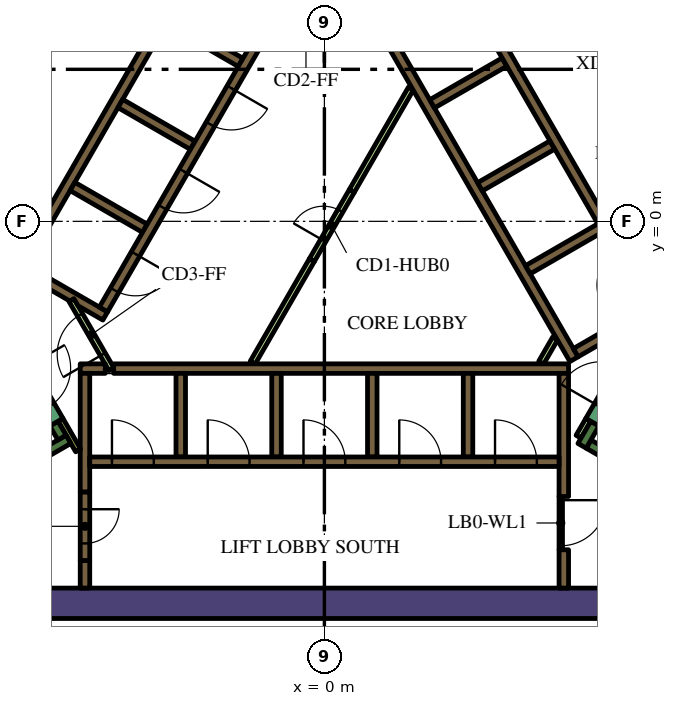
"""IFC4 building model, lengths in metres.
Left out: names, types, materials, properties, quantities, classifications, styles, units other than length and angle.
Written with IfcOpenShell. Run it as: python <this file> out.ifc"""

import sys

from ifc_helpers import new_model, si_unit, direction, frame, frame_2d, origin, place, context, subcontext, project, spatial, polyline, rectangle, outline, extrude, element, fill, save


model = new_model("IFC4")
c1 = context("Model", 3, precision=1e-05, world=origin(), true_north=direction((0.0, 1.0)))
c2 = subcontext(c1, "Body", "Model", "MODEL_VIEW")
j1 = project(units=[si_unit("LENGTHUNIT", "METRE"), si_unit("PLANEANGLEUNIT", "RADIAN")], contexts=[c1])
p1 = place(None, origin())
s1 = spatial("IfcSite", under=j1, at=p1, CompositionType="ELEMENT")
p2 = place(p1, origin())
s2 = spatial("IfcBuilding", under=s1, at=p2, CompositionType="ELEMENT")
p3 = place(p2, frame((0.0, 0.0, 158.4)))
s3 = spatial("IfcBuildingStorey", under=s2, at=p3, CompositionType="ELEMENT", Elevation=158.4)
p4 = place(p3, frame((-13.378, -10.05, 0.0), z_axis=(0.0, 0.0, 1.0), x_axis=(1.0, 0.0, 0.0)))
e1 = element("IfcWall", 1, at=p4, inside=s3, PredefinedType="SOLIDWALL", context=c2, shape_type="SweptSolid", body=[
    extrude(rectangle(XDim=22.282, YDim=0.8, at=frame_2d((11.141, 0.0))), origin(), (0.0, 0.0, 1.0), 4.2),
])
p5 = place(p3, frame((-12.668, -1.842, 0.0), z_axis=(0.0, 0.0, 1.0), x_axis=(0.500003640647, 0.866023301845, 0.0)))
e2 = element("IfcWall", 2, at=p5, inside=s3, PredefinedType="SOLIDWALL", context=c2, shape_type="SweptSolid", body=[
    extrude(rectangle(XDim=15.858, YDim=0.8, at=frame_2d((7.929, 0.0))), origin(), (0.0, 0.0, 1.0), 4.2),
])
p6 = place(p3, frame((12.84, -9.261, 0.0), z_axis=(0.0, 0.0, 1.0), x_axis=(-0.866013990052, 0.500019768644, 0.0)))
e3 = element("IfcWall", 3, at=p6, inside=s3, PredefinedType="SOLIDWALL", context=c2, shape_type="SweptSolid", body=[
    extrude(rectangle(XDim=6.8, YDim=0.25, at=frame_2d((3.4, 0.0))), origin(), (0.0, 0.0, 1.0), 4.2),
])
p7 = place(p3, frame((6.78, -5.906, 0.0), z_axis=(0.0, 0.0, 1.0), x_axis=(0.500223362819, 0.865896406789, 0.0)))
e4 = element("IfcWall", 4, at=p7, inside=s3, PredefinedType="SOLIDWALL", context=c2, shape_type="SweptSolid", body=[
    extrude(rectangle(XDim=0.675, YDim=0.25, at=frame_2d((0.337, 0.0))), origin(), (0.0, 0.0, 1.0), 4.2),
])
p8 = place(p3, frame((-12.84, -9.261, 0.0), z_axis=(0.0, 0.0, 1.0), x_axis=(0.866016039709, 0.500016218704, 0.0)))
e5 = element("IfcWall", 5, at=p8, inside=s3, PredefinedType="SOLIDWALL", context=c2, shape_type="SweptSolid", body=[
    extrude(rectangle(XDim=7.05, YDim=0.25, at=frame_2d((3.525, 0.0))), origin(), (0.0, 0.0, 1.0), 4.2),
])
p9 = place(p3, frame((-6.905, -5.69, 0.0), z_axis=(0.0, 0.0, 1.0), x_axis=(-0.500402024738, 0.865793170242, 0.0)))
e6 = element("IfcWall", 6, at=p9, inside=s3, PredefinedType="SOLIDWALL", context=c2, shape_type="SweptSolid", body=[
    extrude(rectangle(XDim=0.425, YDim=0.25, at=frame_2d((0.212, 0.0))), origin(), (0.0, 0.0, 1.0), 4.2),
])
p10 = place(p3, frame((-6.3, -8.925, 0.0), z_axis=(0.0, 0.0, 1.0), x_axis=(0.0, -1.0, 0.0)))
e7 = element("IfcWall", 7, at=p10, inside=s3, PredefinedType="SOLIDWALL", context=c2, shape_type="SweptSolid", body=[
    extrude(rectangle(XDim=0.725, YDim=0.25, at=frame_2d((0.363, 0.0))), origin(), (0.0, 0.0, 1.0), 4.2),
])
p11 = place(p3, frame((-5.545, -3.875, 0.0), z_axis=(0.0, 0.0, 1.0), x_axis=(1.0, 0.0, 0.0)))
e8 = element("IfcWall", 8, at=p11, inside=s3, PredefinedType="SOLIDWALL", context=c2, shape_type="SweptSolid", body=[
    extrude(rectangle(XDim=11.97, YDim=0.25, at=frame_2d((5.985, 0.0))), origin(), (0.0, 0.0, 1.0), 4.2),
])
p12 = place(p3, frame((-6.425, -3.875, 0.0), z_axis=(0.0, 0.0, 1.0), x_axis=(1.0, 0.0, 0.0)))
e9 = element("IfcWall", 9, at=p12, inside=s3, PredefinedType="SOLIDWALL", context=c2, shape_type="SweptSolid", body=[
    extrude(rectangle(XDim=0.658, YDim=0.25, at=frame_2d((0.329, 0.0))), origin(), (0.0, 0.0, 1.0), 4.2),
])
p13 = place(p3, frame((6.3, -7.24, 0.0), z_axis=(0.0, 0.0, 1.0), x_axis=(0.0, 1.0, 0.0)))
e10 = element("IfcWall", 10, at=p13, inside=s3, PredefinedType="SOLIDWALL", context=c2, shape_type="SweptSolid", body=[
    extrude(rectangle(XDim=3.24, YDim=0.25, at=frame_2d((1.62, 0.0))), origin(), (0.0, 0.0, 1.0), 4.2),
])
p14 = place(p3, frame((6.3, -9.65, 0.0), z_axis=(0.0, 0.0, 1.0), x_axis=(0.0, 1.0, 0.0)))
e11 = element("IfcWall", 11, at=p14, inside=s3, PredefinedType="SOLIDWALL", context=c2, shape_type="SweptSolid", body=[
    extrude(rectangle(XDim=1.008, YDim=0.25, at=frame_2d((0.504, 0.0))), origin(), (0.0, 0.0, 1.0), 4.2),
])
for number, where, z_axis, x_axis in (
    (12, (3.78, -4.0, 0.0), (0.0, 0.0, 1.0), (0.0, -1.0, 0.0)),
    (13, (1.26, -4.0, 0.0), (0.0, 0.0, 1.0), (0.0, -1.0, 0.0)),
    (14, (-1.26, -4.0, 0.0), (0.0, 0.0, 1.0), (0.0, -1.0, 0.0)),
    (15, (-3.78, -4.0, 0.0), (0.0, 0.0, 1.0), (0.0, -1.0, 0.0)),
):
    element("IfcWall", number, at=place(p3, frame(where, z_axis=z_axis, x_axis=x_axis)), inside=s3, PredefinedType="SOLIDWALL", context=c2, shape_type="SweptSolid", body=[
        extrude(rectangle(XDim=2.2, YDim=0.25, at=frame_2d((1.1, 0.0))), origin(), (0.0, 0.0, 1.0), 4.2),
    ])
p15 = place(p3, frame((-6.3, -7.125, 0.0), z_axis=(0.0, 0.0, 1.0), x_axis=(0.0, 1.0, 0.0)))
e16 = element("IfcWall", 16, at=p15, inside=s3, PredefinedType="SOLIDWALL", context=c2, shape_type="SweptSolid", body=[
    extrude(rectangle(XDim=3.125, YDim=0.25, at=frame_2d((1.562, 0.0))), origin(), (0.0, 0.0, 1.0), 4.2),
])
p16 = place(p3, frame((6.568, -3.627, 0.0), z_axis=(0.0, 0.0, 1.0), x_axis=(-0.499999455981, 0.866025717874, 0.0)))
e17 = element("IfcWall", 17, at=p16, inside=s3, PredefinedType="SOLIDWALL", context=c2, shape_type="SweptSolid", body=[
    extrude(rectangle(XDim=11.978, YDim=0.25, at=frame_2d((5.989, 0.0))), origin(), (0.0, 0.0, 1.0), 4.2),
])
for number, where, z_axis, x_axis in (
    (18, (2.834, 3.091, 0.0), (0.0, 0.0, 1.0), (0.866, 0.5, 0.0)),
    (19, (4.094, 0.909, 0.0), (0.0, 0.0, 1.0), (0.866, 0.5, 0.0)),
    (20, (5.354, -1.274, 0.0), (0.0, 0.0, 1.0), (0.866, 0.5, 0.0)),
):
    element("IfcWall", number, at=place(p3, frame(where, z_axis=z_axis, x_axis=x_axis)), inside=s3, PredefinedType="SOLIDWALL", context=c2, shape_type="SweptSolid", body=[
        extrude(rectangle(XDim=2.2, YDim=0.25, at=frame_2d((1.1, 0.0))), origin(), (0.0, 0.0, 1.0), 4.2),
    ])
p17 = place(p3, frame((6.614, -3.456, 0.0), z_axis=(0.0, 0.0, 1.0), x_axis=(0.866032512851, 0.499987686533, 0.0)))
e21 = element("IfcWall", 21, at=p17, inside=s3, PredefinedType="SOLIDWALL", context=c2, shape_type="SweptSolid", body=[
    extrude(rectangle(XDim=2.975, YDim=0.25, at=frame_2d((1.487, 0.0))), origin(), (0.0, 0.0, 1.0), 4.2),
])
p18 = place(p3, frame((-8.06, -1.311, 0.0), z_axis=(0.0, 0.0, 1.0), x_axis=(0.50000273126, 0.866023826885, 0.0)))
e22 = element("IfcWall", 22, at=p18, inside=s3, PredefinedType="SOLIDWALL", context=c2, shape_type="SweptSolid", body=[
    extrude(rectangle(XDim=10.33, YDim=0.25, at=frame_2d((5.165, 0.0))), origin(), (0.0, 0.0, 1.0), 4.2),
])
for number, where, z_axis, x_axis in (
    (23, (-2.204, 4.182, 0.0), (0.0, 0.0, 1.0), (-0.866, 0.5, 0.0)),
    (24, (-5.369, 3.1, 0.0), (0.0, 0.0, 1.0), (0.866, -0.5, 0.0)),
    (25, (-4.724, -0.182, 0.0), (0.0, 0.0, 1.0), (-0.866, 0.5, 0.0)),
):
    element("IfcWall", number, at=place(p3, frame(where, z_axis=z_axis, x_axis=x_axis)), inside=s3, PredefinedType="SOLIDWALL", context=c2, shape_type="SweptSolid", body=[
        extrude(rectangle(XDim=2.2, YDim=0.25, at=frame_2d((1.1, 0.0))), origin(), (0.0, 0.0, 1.0), 4.2),
    ])
p19 = place(p3, origin())
e26 = element("IfcWall", 26, at=p19, inside=s3, PredefinedType="SOLIDWALL", context=c2, shape_type="SweptSolid", body=[
    extrude(outline(polyline([(-5.922, -2.257), (-5.922, -2.257), (-5.705, -2.382), (-5.83, -2.598), (-6.483, -2.221), (-6.591, -2.033), (-6.591, -2.033), (-6.7, -2.096), (-7.952, -1.373), (-7.827, -1.156), (-5.922, -2.257)])), origin(), (0.0, 0.0, 1.0), 4.2),
])
p20 = place(p3, frame((-6.48, -6.027, 0.0), z_axis=(0.0, 0.0, 1.0), x_axis=(-0.499927229454, 0.866067413802, 0.0)))
e27 = element("IfcWall", 27, at=p20, inside=s3, PredefinedType="PARTITIONING", context=c2, shape_type="SweptSolid", body=[
    extrude(rectangle(XDim=0.929, YDim=0.15, at=frame_2d((0.464, 0.0))), origin(), (0.0, 0.0, 1.0), 4.2),
])
p21 = place(p3, frame((6.945, -5.222, 0.0), z_axis=(0.0, 0.0, 1.0), x_axis=(-0.499818422106, -0.866130212453, 0.0)))
e28 = element("IfcWall", 28, at=p21, inside=s3, PredefinedType="PARTITIONING", context=c2, shape_type="SweptSolid", body=[
    extrude(rectangle(XDim=0.514, YDim=0.15, at=frame_2d((0.257, 0.0))), origin(), (0.0, 0.0, 1.0), 3.15),
])
p22 = place(p3, frame((5.705, -3.718, 0.0), z_axis=(0.0, 0.0, 1.0), x_axis=(0.499962090823, 0.866047289552, 0.0)))
e29 = element("IfcWall", 29, at=p22, inside=s3, PredefinedType="PARTITIONING", context=c2, shape_type="SweptSolid", body=[
    extrude(rectangle(XDim=0.735, YDim=0.15, at=frame_2d((0.367, 0.0))), origin(), (0.0, 0.0, 1.0), 3.15),
])
p23 = place(p3, frame((-1.887, -3.718, 0.0), z_axis=(0.0, 0.0, 1.0), x_axis=(0.500043732237, 0.866000153493, 0.0)))
e30 = element("IfcWall", 30, at=p23, inside=s3, PredefinedType="PARTITIONING", context=c2, shape_type="SweptSolid", body=[
    extrude(rectangle(XDim=3.114, YDim=0.15, at=frame_2d((1.557, 0.0))), origin(), (0.0, 0.0, 1.0), 3.15),
])
p24 = place(p3, frame((0.72, 0.797, 0.0), z_axis=(0.0, 0.0, 1.0), x_axis=(0.499984921984, 0.866034108906, 0.0)))
e31 = element("IfcWall", 31, at=p24, inside=s3, PredefinedType="PARTITIONING", context=c2, shape_type="SweptSolid", body=[
    extrude(rectangle(XDim=3.113, YDim=0.15, at=frame_2d((1.557, 0.0))), origin(), (0.0, 0.0, 1.0), 3.15),
])
p25 = place(p3, frame((-6.175, -6.325, 0.0), z_axis=(0.0, 0.0, 1.0), x_axis=(1.0, 0.0, 0.0)))
e32 = element("IfcWall", 32, at=p25, inside=s3, PredefinedType="SOLIDWALL", context=c2, shape_type="SweptSolid", body=[
    extrude(rectangle(XDim=12.35, YDim=0.25, at=frame_2d((6.175, 0.0))), origin(), (0.0, 0.0, 1.0), 4.2),
])
p26 = place(p25, frame((0.585, 0.0, 0.0)))
e33 = element("IfcOpeningElement", 33, at=p26, cuts=e32, PredefinedType="OPENING", context=c2, shape_type="SweptSolid", body=[
    extrude(rectangle(XDim=1.1, YDim=2.1, at=frame_2d((0.55, 1.05))), frame((0.0, 0.135, 0.0), z_axis=(0.0, -1.0, 0.0), x_axis=(1.0, 0.0, 0.0)), (0.0, 0.0, 1.0), 0.27),
])
p27 = place(p25, frame((3.105, 0.0, 0.0)))
e34 = element("IfcOpeningElement", 34, at=p27, cuts=e32, PredefinedType="OPENING", context=c2, shape_type="SweptSolid", body=[
    extrude(rectangle(XDim=1.1, YDim=2.1, at=frame_2d((0.55, 1.05))), frame((0.0, 0.135, 0.0), z_axis=(0.0, -1.0, 0.0), x_axis=(1.0, 0.0, 0.0)), (0.0, 0.0, 1.0), 0.27),
])
p28 = place(p25, frame((5.625, 0.0, 0.0)))
e35 = element("IfcOpeningElement", 35, at=p28, cuts=e32, PredefinedType="OPENING", context=c2, shape_type="SweptSolid", body=[
    extrude(rectangle(XDim=1.1, YDim=2.1, at=frame_2d((0.55, 1.05))), frame((0.0, 0.135, 0.0), z_axis=(0.0, -1.0, 0.0), x_axis=(1.0, 0.0, 0.0)), (0.0, 0.0, 1.0), 0.27),
])
p29 = place(p25, frame((8.145, 0.0, 0.0)))
e36 = element("IfcOpeningElement", 36, at=p29, cuts=e32, PredefinedType="OPENING", context=c2, shape_type="SweptSolid", body=[
    extrude(rectangle(XDim=1.1, YDim=2.1, at=frame_2d((0.55, 1.05))), frame((0.0, 0.135, 0.0), z_axis=(0.0, -1.0, 0.0), x_axis=(1.0, 0.0, 0.0)), (0.0, 0.0, 1.0), 0.27),
])
p30 = place(p25, frame((10.665, 0.0, 0.0)))
e37 = element("IfcOpeningElement", 37, at=p30, cuts=e32, PredefinedType="OPENING", context=c2, shape_type="SweptSolid", body=[
    extrude(rectangle(XDim=1.1, YDim=2.1, at=frame_2d((0.55, 1.05))), frame((0.0, 0.135, 0.0), z_axis=(0.0, -1.0, 0.0), x_axis=(1.0, 0.0, 0.0)), (0.0, 0.0, 1.0), 0.27),
])
p31 = place(p3, frame((8.565, -2.185, 0.0), z_axis=(0.0, 0.0, 1.0), x_axis=(-0.499997954832, 0.866026584559, 0.0)))
e38 = element("IfcWall", 38, at=p31, inside=s3, PredefinedType="SOLIDWALL", context=c2, shape_type="SweptSolid", body=[
    extrude(rectangle(XDim=12.35, YDim=0.25, at=frame_2d((6.175, 0.0))), origin(), (0.0, 0.0, 1.0), 4.2),
])
p32 = place(p31, frame((0.585, 0.0, 0.0)))
e39 = element("IfcOpeningElement", 39, at=p32, cuts=e38, PredefinedType="OPENING", context=c2, shape_type="SweptSolid", body=[
    extrude(rectangle(XDim=1.1, YDim=2.1, at=frame_2d((0.55, 1.05))), frame((0.0, 0.135, 0.0), z_axis=(0.0, -1.0, 0.0), x_axis=(1.0, 0.0, 0.0)), (0.0, 0.0, 1.0), 0.27),
])
p33 = place(p3, frame((-0.898, 6.194, 0.0), z_axis=(0.0, 0.0, 1.0), x_axis=(-0.499996202215, -0.866027596426, 0.0)))
e40 = element("IfcWall", 40, at=p33, inside=s3, PredefinedType="SOLIDWALL", context=c2, shape_type="SweptSolid", body=[
    extrude(rectangle(XDim=9.83, YDim=0.25, at=frame_2d((4.915, 0.0))), origin(), (0.0, 0.0, 1.0), 4.2),
])
p34 = place(p33, frame((0.585, 0.0, 0.0)))
e41 = element("IfcOpeningElement", 41, at=p34, cuts=e40, PredefinedType="OPENING", context=c2, shape_type="SweptSolid", body=[
    extrude(rectangle(XDim=1.1, YDim=2.1, at=frame_2d((0.55, 1.05))), frame((0.0, 0.135, 0.0), z_axis=(0.0, -1.0, 0.0), x_axis=(1.0, 0.0, 0.0)), (0.0, 0.0, 1.0), 0.27),
])
p35 = place(p33, frame((3.105, 0.0, 0.0)))
e42 = element("IfcOpeningElement", 42, at=p35, cuts=e40, PredefinedType="OPENING", context=c2, shape_type="SweptSolid", body=[
    extrude(rectangle(XDim=1.1, YDim=2.1, at=frame_2d((0.55, 1.05))), frame((0.0, 0.135, 0.0), z_axis=(0.0, -1.0, 0.0), x_axis=(1.0, 0.0, 0.0)), (0.0, 0.0, 1.0), 0.27),
])
p36 = place(p33, frame((5.625, 0.0, 0.0)))
e43 = element("IfcOpeningElement", 43, at=p36, cuts=e40, PredefinedType="OPENING", context=c2, shape_type="SweptSolid", body=[
    extrude(rectangle(XDim=1.1, YDim=2.1, at=frame_2d((0.55, 1.05))), frame((0.0, 0.135, 0.0), z_axis=(0.0, -1.0, 0.0), x_axis=(1.0, 0.0, 0.0)), (0.0, 0.0, 1.0), 0.27),
])
p37 = place(p33, frame((8.145, 0.0, 0.0)))
e44 = element("IfcOpeningElement", 44, at=p37, cuts=e40, PredefinedType="OPENING", context=c2, shape_type="SweptSolid", body=[
    extrude(rectangle(XDim=1.1, YDim=2.1, at=frame_2d((0.55, 1.05))), frame((0.0, 0.135, 0.0), z_axis=(0.0, -1.0, 0.0), x_axis=(1.0, 0.0, 0.0)), (0.0, 0.0, 1.0), 0.27),
])
p38 = place(p3, frame((7.053, -5.284, 0.0), z_axis=(0.0, 0.0, 1.0), x_axis=(0.500078061341, 0.865980330357, 0.0)))
e45 = element("IfcWall", 45, at=p38, inside=s3, PredefinedType="SOLIDWALL", context=c2, shape_type="SweptSolid", body=[
    extrude(rectangle(XDim=2.1, YDim=0.4, at=frame_2d((1.05, 0.0))), origin(), (0.0, 0.0, 1.0), 4.2),
])
p39 = place(p38, frame((0.45, 0.0, 0.0)))
e46 = element("IfcOpeningElement", 46, at=p39, cuts=e45, PredefinedType="OPENING", context=c2, shape_type="SweptSolid", body=[
    extrude(rectangle(XDim=1.2, YDim=2.1, at=frame_2d((0.6, 1.05))), frame((0.0, 0.21, 0.0), z_axis=(0.0, -1.0, 0.0), x_axis=(1.0, 0.0, 0.0)), (0.0, 0.0, 1.0), 0.42),
])
p40 = place(p3, frame((-8.103, -3.466, 0.0), z_axis=(0.0, 0.0, 1.0), x_axis=(0.500078061341, -0.865980330357, 0.0)))
e47 = element("IfcWall", 47, at=p40, inside=s3, PredefinedType="SOLIDWALL", context=c2, shape_type="SweptSolid", body=[
    extrude(rectangle(XDim=2.1, YDim=0.4, at=frame_2d((1.05, 0.0))), origin(), (0.0, 0.0, 1.0), 4.2),
])
p41 = place(p40, frame((0.45, 0.0, 0.0)))
e48 = element("IfcOpeningElement", 48, at=p41, cuts=e47, PredefinedType="OPENING", context=c2, shape_type="SweptSolid", body=[
    extrude(rectangle(XDim=1.2, YDim=2.1, at=frame_2d((0.6, 1.05))), frame((0.0, 0.21, 0.0), z_axis=(0.0, -1.0, 0.0), x_axis=(1.0, 0.0, 0.0)), (0.0, 0.0, 1.0), 0.42),
])
p42 = place(p3, frame((-6.3, -7.125, 0.0), z_axis=(0.0, 0.0, 1.0), x_axis=(0.0, -1.0, 0.0)))
e49 = element("IfcWall", 49, at=p42, inside=s3, PredefinedType="SOLIDWALL", context=c2, shape_type="SweptSolid", body=[
    extrude(rectangle(XDim=1.8, YDim=0.25, at=frame_2d((0.9, 0.0))), origin(), (0.0, 0.0, 1.0), 4.2),
])
p43 = place(p42, frame((0.45, 0.0, 0.0)))
e50 = element("IfcOpeningElement", 50, at=p43, cuts=e49, PredefinedType="OPENING", context=c2, shape_type="SweptSolid", body=[
    extrude(rectangle(XDim=0.9, YDim=2.1, at=frame_2d((0.45, 1.05))), frame((0.0, 0.135, 0.0), z_axis=(0.0, -1.0, 0.0), x_axis=(1.0, 0.0, 0.0)), (0.0, 0.0, 1.0), 0.27),
])
p44 = place(p3, frame((-0.33, -1.022, 0.0), z_axis=(0.0, 0.0, 1.0), x_axis=(0.500027713859, 0.866009402589, 0.0)))
e51 = element("IfcWall", 51, at=p44, inside=s3, PredefinedType="PARTITIONING", context=c2, shape_type="SweptSolid", body=[
    extrude(rectangle(XDim=2.1, YDim=0.15, at=frame_2d((1.05, 0.0))), origin(), (0.0, 0.0, 1.0), 3.15),
])
p45 = place(p44, frame((0.6, 0.0, 0.0)))
e52 = element("IfcOpeningElement", 52, at=p45, cuts=e51, PredefinedType="OPENING", context=c2, shape_type="SweptSolid", body=[
    extrude(rectangle(XDim=0.9, YDim=2.1, at=frame_2d((0.45, 1.05))), frame((0.0, 0.085, 0.0), z_axis=(0.0, -1.0, 0.0), x_axis=(1.0, 0.0, 0.0)), (0.0, 0.0, 1.0), 0.17),
])
p46 = place(p3, frame((-5.606, -3.89, 0.0), z_axis=(0.0, 0.0, 1.0), x_axis=(-0.500027713859, 0.866009402589, 0.0)))
e53 = element("IfcWall", 53, at=p46, inside=s3, PredefinedType="PARTITIONING", context=c2, shape_type="SweptSolid", body=[
    extrude(rectangle(XDim=2.1, YDim=0.15, at=frame_2d((1.05, 0.0))), origin(), (0.0, 0.0, 1.0), 3.15),
])
p47 = place(p46, frame((0.45, 0.0, 0.0)))
e54 = element("IfcOpeningElement", 54, at=p47, cuts=e53, PredefinedType="OPENING", context=c2, shape_type="SweptSolid", body=[
    extrude(rectangle(XDim=1.2, YDim=2.1, at=frame_2d((0.6, 1.05))), frame((0.0, 0.085, 0.0), z_axis=(0.0, -1.0, 0.0), x_axis=(1.0, 0.0, 0.0)), (0.0, 0.0, 1.0), 0.17),
])
p48 = place(p3, frame((6.22, -7.237, 0.0), z_axis=(0.0, 0.0, 1.0), x_axis=(0.0, -1.0, 0.0)))
e55 = element("IfcWall", 55, at=p48, inside=s3, PredefinedType="PARTITIONING", context=c2, shape_type="SweptSolid", body=[
    extrude(rectangle(XDim=1.4, YDim=0.09, at=frame_2d((0.7, 0.0))), origin(), (0.0, 0.0, 1.0), 3.15),
])
p49 = place(p48, frame((0.1, 0.0, 0.0)))
e56 = element("IfcOpeningElement", 56, at=p49, cuts=e55, PredefinedType="OPENING", context=c2, shape_type="SweptSolid", body=[
    extrude(rectangle(XDim=1.2, YDim=2.1, at=frame_2d((0.6, 1.05))), frame((0.0, 0.055, 0.0), z_axis=(0.0, -1.0, 0.0), x_axis=(1.0, 0.0, 0.0)), (0.0, 0.0, 1.0), 0.11),
])
p50 = place(p26, origin())
e57 = element("IfcDoor", 57, at=p50, inside=s3, OperationType="DOUBLE_DOOR_SLIDING", PredefinedType="DOOR", context=c2, shape_type="SweptSolid", body=[
    extrude(rectangle(XDim=1.1, YDim=2.1, at=frame_2d((0.55, 1.05))), frame((0.0, 0.025, 0.0), z_axis=(0.0, -1.0, 0.0), x_axis=(1.0, 0.0, 0.0)), (0.0, 0.0, 1.0), 0.05),
])
fill(e33, e57)
p51 = place(p27, origin())
e58 = element("IfcDoor", 58, at=p51, inside=s3, OperationType="DOUBLE_DOOR_SLIDING", PredefinedType="DOOR", context=c2, shape_type="SweptSolid", body=[
    extrude(rectangle(XDim=1.1, YDim=2.1, at=frame_2d((0.55, 1.05))), frame((0.0, 0.025, 0.0), z_axis=(0.0, -1.0, 0.0), x_axis=(1.0, 0.0, 0.0)), (0.0, 0.0, 1.0), 0.05),
])
fill(e34, e58)
p52 = place(p28, origin())
e59 = element("IfcDoor", 59, at=p52, inside=s3, OperationType="DOUBLE_DOOR_SLIDING", PredefinedType="DOOR", context=c2, shape_type="SweptSolid", body=[
    extrude(rectangle(XDim=1.1, YDim=2.1, at=frame_2d((0.55, 1.05))), frame((0.0, 0.025, 0.0), z_axis=(0.0, -1.0, 0.0), x_axis=(1.0, 0.0, 0.0)), (0.0, 0.0, 1.0), 0.05),
])
fill(e35, e59)
p53 = place(p29, origin())
e60 = element("IfcDoor", 60, at=p53, inside=s3, OperationType="DOUBLE_DOOR_SLIDING", PredefinedType="DOOR", context=c2, shape_type="SweptSolid", body=[
    extrude(rectangle(XDim=1.1, YDim=2.1, at=frame_2d((0.55, 1.05))), frame((0.0, 0.025, 0.0), z_axis=(0.0, -1.0, 0.0), x_axis=(1.0, 0.0, 0.0)), (0.0, 0.0, 1.0), 0.05),
])
fill(e36, e60)
p54 = place(p30, origin())
e61 = element("IfcDoor", 61, at=p54, inside=s3, OperationType="DOUBLE_DOOR_SLIDING", PredefinedType="DOOR", context=c2, shape_type="SweptSolid", body=[
    extrude(rectangle(XDim=1.1, YDim=2.1, at=frame_2d((0.55, 1.05))), frame((0.0, 0.025, 0.0), z_axis=(0.0, -1.0, 0.0), x_axis=(1.0, 0.0, 0.0)), (0.0, 0.0, 1.0), 0.05),
])
fill(e37, e61)
p55 = place(p35, origin())
e62 = element("IfcDoor", 62, at=p55, inside=s3, OperationType="DOUBLE_DOOR_SLIDING", PredefinedType="DOOR", context=c2, shape_type="SweptSolid", body=[
    extrude(rectangle(XDim=1.1, YDim=2.1, at=frame_2d((0.55, 1.05))), frame((0.0, 0.025, 0.0), z_axis=(0.0, -1.0, 0.0), x_axis=(1.0, 0.0, 0.0)), (0.0, 0.0, 1.0), 0.05),
])
fill(e42, e62)
p56 = place(p36, origin())
e63 = element("IfcDoor", 63, at=p56, inside=s3, OperationType="DOUBLE_DOOR_SLIDING", PredefinedType="DOOR", context=c2, shape_type="SweptSolid", body=[
    extrude(rectangle(XDim=1.1, YDim=2.1, at=frame_2d((0.55, 1.05))), frame((0.0, 0.025, 0.0), z_axis=(0.0, -1.0, 0.0), x_axis=(1.0, 0.0, 0.0)), (0.0, 0.0, 1.0), 0.05),
])
fill(e43, e63)
p57 = place(p37, origin())
e64 = element("IfcDoor", 64, at=p57, inside=s3, OperationType="DOUBLE_DOOR_SLIDING", PredefinedType="DOOR", context=c2, shape_type="SweptSolid", body=[
    extrude(rectangle(XDim=1.1, YDim=2.1, at=frame_2d((0.55, 1.05))), frame((0.0, 0.025, 0.0), z_axis=(0.0, -1.0, 0.0), x_axis=(1.0, 0.0, 0.0)), (0.0, 0.0, 1.0), 0.05),
])
fill(e44, e64)
p58 = place(p43, origin())
e65 = element("IfcDoor", 65, at=p58, inside=s3, OperationType="SINGLE_SWING_LEFT", PredefinedType="DOOR", context=c2, shape_type="SweptSolid", body=[
    extrude(rectangle(XDim=0.9, YDim=2.1, at=frame_2d((0.45, 1.05))), frame((0.0, 0.025, 0.0), z_axis=(0.0, -1.0, 0.0), x_axis=(1.0, 0.0, 0.0)), (0.0, 0.0, 1.0), 0.05),
])
fill(e50, e65)
p59 = place(p45, origin())
e66 = element("IfcDoor", 66, at=p59, inside=s3, OperationType="SINGLE_SWING_LEFT", PredefinedType="DOOR", context=c2, shape_type="SweptSolid", body=[
    extrude(rectangle(XDim=0.9, YDim=2.1, at=frame_2d((0.45, 1.05))), frame((0.0, 0.025, 0.0), z_axis=(0.0, -1.0, 0.0), x_axis=(1.0, 0.0, 0.0)), (0.0, 0.0, 1.0), 0.05),
])
fill(e52, e66)
p60 = place(p47, origin())
e67 = element("IfcDoor", 67, at=p60, inside=s3, OperationType="SINGLE_SWING_LEFT", PredefinedType="DOOR", context=c2, shape_type="SweptSolid", body=[
    extrude(rectangle(XDim=1.2, YDim=2.1, at=frame_2d((0.6, 1.05))), frame((0.0, 0.025, 0.0), z_axis=(0.0, -1.0, 0.0), x_axis=(1.0, 0.0, 0.0)), (0.0, 0.0, 1.0), 0.05),
])
fill(e54, e67)
p61 = place(p49, origin())
e68 = element("IfcDoor", 68, at=p61, inside=s3, OperationType="SINGLE_SWING_LEFT", PredefinedType="DOOR", context=c2, shape_type="SweptSolid", body=[
    extrude(rectangle(XDim=1.2, YDim=2.1, at=frame_2d((0.6, 1.05))), frame((0.0, 0.025, 0.0), z_axis=(0.0, -1.0, 0.0), x_axis=(1.0, 0.0, 0.0)), (0.0, 0.0, 1.0), 0.05),
])
fill(e56, e68)
save(model, sys.argv[1])
